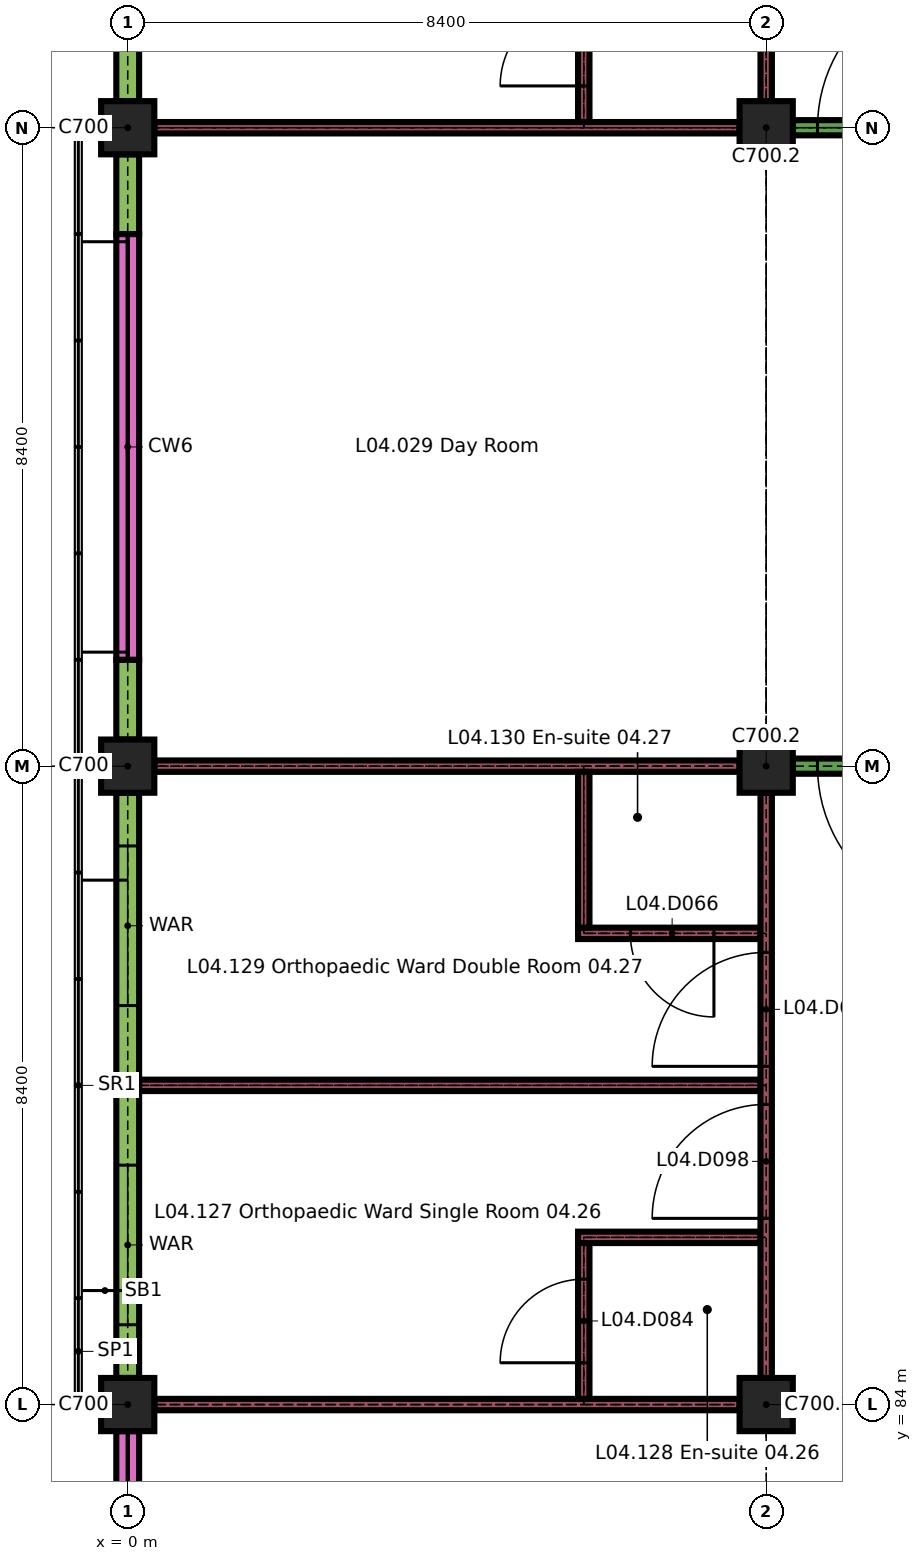
"""IFC4 building model, lengths in metres.
Left out: names, types, materials, properties, quantities, classifications, styles, units other than length and angle.
Written with IfcOpenShell. Run it as: python <this file> out.ifc"""

import sys

from ifc_helpers import new_model, si_unit, direction, frame, frame_2d, origin, origin_2d, place, context, subcontext, project, spatial, rectangle, extrude, element, fill, save


model = new_model("IFC4")
c1 = context("Model", 3, precision=1e-05, world=origin(), true_north=direction((0.0, 1.0)))
c2 = subcontext(c1, "Body", "Model", "MODEL_VIEW")
j1 = project(units=[si_unit("LENGTHUNIT", "METRE"), si_unit("PLANEANGLEUNIT", "RADIAN")], contexts=[c1])
p1 = place(None, origin())
s1 = spatial("IfcSite", under=j1, at=p1, CompositionType="ELEMENT")
p2 = place(p1, origin())
s2 = spatial("IfcBuilding", under=s1, at=p2, CompositionType="ELEMENT")
p3 = place(p2, frame((0.0, 0.0, 18.9)))
s3 = spatial("IfcBuildingStorey", under=s2, at=p3, CompositionType="ELEMENT", Elevation=18.9)
for number, where, z_axis, x_axis in (
    (1, (0.0, 84.0, 0.0), (0.0, 0.0, 1.0), (1.0, 0.0, 0.0)),
    (2, (8.4, 84.0, 0.0), (0.0, 0.0, 1.0), (1.0, 0.0, 0.0)),
    (3, (0.0, 92.4, 0.0), (0.0, 0.0, 1.0), (1.0, 0.0, 0.0)),
    (4, (8.4, 92.4, 0.0), (0.0, 0.0, 1.0), (1.0, 0.0, 0.0)),
    (5, (0.0, 100.8, 0.0), (0.0, 0.0, 1.0), (1.0, 0.0, 0.0)),
    (6, (8.4, 100.8, 0.0), (0.0, 0.0, 1.0), (1.0, 0.0, 0.0)),
):
    element("IfcColumn", number, at=place(p3, frame(where, z_axis=z_axis, x_axis=x_axis)), inside=s3, PredefinedType="COLUMN", context=c2, shape_type="SweptSolid", body=[
        extrude(rectangle(XDim=0.7, YDim=0.7, at=origin_2d()), origin(), (0.0, 0.0, 1.0), 3.26),
    ])
p4 = place(p3, frame((0.0, 79.8, 0.0), z_axis=(0.0, 0.0, 1.0), x_axis=(0.0, 1.0, 0.0)))
e7 = element("IfcWall", 7, at=p4, inside=s3, PredefinedType="SOLIDWALL", context=c2, shape_type="SweptSolid", body=[
    extrude(rectangle(XDim=3.85, YDim=0.3, at=frame_2d((1.925, 0.0))), origin(), (0.0, 0.0, 1.0), 0.6),
])
p5 = place(p3, frame((0.0, 84.35, 0.0), z_axis=(0.0, 0.0, 1.0), x_axis=(0.0, 1.0, 0.0)))
e8 = element("IfcWall", 8, at=p5, inside=s3, PredefinedType="SOLIDWALL", context=c2, shape_type="SweptSolid", body=[
    extrude(rectangle(XDim=3.85, YDim=0.3, at=frame_2d((1.925, 0.0))), origin(), (0.0, 0.0, 1.0), 2.96),
])
p6 = place(p5, frame((0.7, 0.0, 0.9)))
e9 = element("IfcOpeningElement", 9, at=p6, cuts=e8, PredefinedType="OPENING", context=c2, shape_type="SweptSolid", body=[
    extrude(rectangle(XDim=2.1, YDim=1.5, at=frame_2d((1.05, 0.75))), frame((0.0, 0.16, 0.0), z_axis=(0.0, -1.0, 0.0), x_axis=(1.0, 0.0, 0.0)), (0.0, 0.0, 1.0), 0.32),
])
p7 = place(p3, frame((0.0, 88.2, 0.0), z_axis=(0.0, 0.0, 1.0), x_axis=(0.0, 1.0, 0.0)))
e10 = element("IfcWall", 10, at=p7, inside=s3, PredefinedType="SOLIDWALL", context=c2, shape_type="SweptSolid", body=[
    extrude(rectangle(XDim=3.85, YDim=0.3, at=frame_2d((1.925, 0.0))), origin(), (0.0, 0.0, 1.0), 2.96),
])
p8 = place(p7, frame((1.05, 0.0, 0.9)))
e11 = element("IfcOpeningElement", 11, at=p8, cuts=e10, PredefinedType="OPENING", context=c2, shape_type="SweptSolid", body=[
    extrude(rectangle(XDim=2.1, YDim=1.5, at=frame_2d((1.05, 0.75))), frame((0.0, 0.16, 0.0), z_axis=(0.0, -1.0, 0.0), x_axis=(1.0, 0.0, 0.0)), (0.0, 0.0, 1.0), 0.32),
])
for number, where, z_axis, x_axis in (
    (12, (0.0, 92.75, 0.0), (0.0, 0.0, 1.0), (0.0, 1.0, 0.0)),
    (13, (0.0, 99.4, 0.0), (0.0, 0.0, 1.0), (0.0, 1.0, 0.0)),
):
    element("IfcWall", number, at=place(p3, frame(where, z_axis=z_axis, x_axis=x_axis)), inside=s3, PredefinedType="SOLIDWALL", context=c2, shape_type="SweptSolid", body=[
        extrude(rectangle(XDim=1.05, YDim=0.3, at=frame_2d((0.525, 0.0))), origin(), (0.0, 0.0, 1.0), 2.96),
    ])
p9 = place(p3, frame((0.0, 93.8, 0.0), z_axis=(0.0, 0.0, 1.0), x_axis=(0.0, 1.0, 0.0)))
e14 = element("IfcWall", 14, at=p9, inside=s3, PredefinedType="SOLIDWALL", context=c2, shape_type="SweptSolid", body=[
    extrude(rectangle(XDim=5.6, YDim=0.3, at=frame_2d((2.8, 0.0))), origin(), (0.0, 0.0, 1.0), 0.6),
])
p10 = place(p3, frame((0.0, 101.15, 0.0), z_axis=(0.0, 0.0, 1.0), x_axis=(0.0, 1.0, 0.0)))
e15 = element("IfcWall", 15, at=p10, inside=s3, PredefinedType="SOLIDWALL", context=c2, shape_type="SweptSolid", body=[
    extrude(rectangle(XDim=3.85, YDim=0.3, at=frame_2d((1.925, 0.0))), origin(), (0.0, 0.0, 1.0), 2.96),
])
p11 = place(p10, frame((0.7, 0.0, 0.9)))
e16 = element("IfcOpeningElement", 16, at=p11, cuts=e15, PredefinedType="OPENING", context=c2, shape_type="SweptSolid", body=[
    extrude(rectangle(XDim=2.1, YDim=1.5, at=frame_2d((1.05, 0.75))), frame((0.0, 0.16, 0.0), z_axis=(0.0, -1.0, 0.0), x_axis=(1.0, 0.0, 0.0)), (0.0, 0.0, 1.0), 0.32),
])
p12 = place(p3, frame((0.35, 84.0, 0.0), z_axis=(0.0, 0.0, 1.0), x_axis=(1.0, 0.0, 0.0)))
e17 = element("IfcWall", 17, at=p12, inside=s3, PredefinedType="PARTITIONING", context=c2, shape_type="SweptSolid", body=[
    extrude(rectangle(XDim=7.7, YDim=0.15, at=frame_2d((3.85, 0.0))), origin(), (0.0, 0.0, 1.0), 3.26),
])
p13 = place(p3, frame((5.925, 86.2, 0.0), z_axis=(0.0, 0.0, 1.0), x_axis=(1.0, 0.0, 0.0)))
e18 = element("IfcWall", 18, at=p13, inside=s3, PredefinedType="PARTITIONING", context=c2, shape_type="SweptSolid", body=[
    extrude(rectangle(XDim=2.4, YDim=0.15, at=frame_2d((1.2, 0.0))), origin(), (0.0, 0.0, 1.0), 3.26),
])
p14 = place(p3, frame((0.15, 88.2, 0.0), z_axis=(0.0, 0.0, 1.0), x_axis=(1.0, 0.0, 0.0)))
e19 = element("IfcWall", 19, at=p14, inside=s3, PredefinedType="PARTITIONING", context=c2, shape_type="SweptSolid", body=[
    extrude(rectangle(XDim=8.175, YDim=0.15, at=frame_2d((4.087, 0.0))), origin(), (0.0, 0.0, 1.0), 3.26),
])
p15 = place(p3, frame((5.925, 90.2, 0.0), z_axis=(0.0, 0.0, 1.0), x_axis=(1.0, 0.0, 0.0)))
e20 = element("IfcWall", 20, at=p15, inside=s3, PredefinedType="PARTITIONING", context=c2, shape_type="SweptSolid", body=[
    extrude(rectangle(XDim=2.4, YDim=0.15, at=frame_2d((1.2, 0.0))), origin(), (0.0, 0.0, 1.0), 3.26),
])
p16 = place(p15, frame((0.688, 0.0, 0.0)))
e21 = element("IfcOpeningElement", 21, at=p16, cuts=e20, PredefinedType="OPENING", context=c2, shape_type="SweptSolid", body=[
    extrude(rectangle(XDim=1.1, YDim=2.1, at=frame_2d((0.55, 1.05))), frame((0.0, 0.085, 0.0), z_axis=(0.0, -1.0, 0.0), x_axis=(1.0, 0.0, 0.0)), (0.0, 0.0, 1.0), 0.17),
])
p17 = place(p3, frame((0.35, 92.4, 0.0), z_axis=(0.0, 0.0, 1.0), x_axis=(1.0, 0.0, 0.0)))
e22 = element("IfcWall", 22, at=p17, inside=s3, PredefinedType="PARTITIONING", context=c2, shape_type="SweptSolid", body=[
    extrude(rectangle(XDim=7.7, YDim=0.15, at=frame_2d((3.85, 0.0))), origin(), (0.0, 0.0, 1.0), 3.26),
])
p18 = place(p3, frame((8.75, 92.4, 0.0), z_axis=(0.0, 0.0, 1.0), x_axis=(1.0, 0.0, 0.0)))
e23 = element("IfcWall", 23, at=p18, inside=s3, PredefinedType="PARTITIONING", context=c2, shape_type="SweptSolid", body=[
    extrude(rectangle(XDim=7.7, YDim=0.2, at=frame_2d((3.85, 0.0))), origin(), (0.0, 0.0, 1.0), 3.26),
])
p19 = place(p18, frame((0.325, 0.0, 0.0)))
e24 = element("IfcOpeningElement", 24, at=p19, cuts=e23, PredefinedType="OPENING", context=c2, shape_type="SweptSolid", body=[
    extrude(rectangle(XDim=2.0, YDim=2.4, at=frame_2d((1.0, 1.2))), frame((0.0, 0.11, 0.0), z_axis=(0.0, -1.0, 0.0), x_axis=(1.0, 0.0, 0.0)), (0.0, 0.0, 1.0), 0.22),
])
p20 = place(p18, frame((5.375, 0.0, 0.0)))
e25 = element("IfcOpeningElement", 25, at=p20, cuts=e23, PredefinedType="OPENING", context=c2, shape_type="SweptSolid", body=[
    extrude(rectangle(XDim=2.0, YDim=2.4, at=frame_2d((1.0, 1.2))), frame((0.0, 0.11, 0.0), z_axis=(0.0, -1.0, 0.0), x_axis=(1.0, 0.0, 0.0)), (0.0, 0.0, 1.0), 0.22),
])
p21 = place(p3, frame((0.35, 100.8, 0.0), z_axis=(0.0, 0.0, 1.0), x_axis=(1.0, 0.0, 0.0)))
e26 = element("IfcWall", 26, at=p21, inside=s3, PredefinedType="PARTITIONING", context=c2, shape_type="SweptSolid", body=[
    extrude(rectangle(XDim=7.7, YDim=0.15, at=frame_2d((3.85, 0.0))), origin(), (0.0, 0.0, 1.0), 3.26),
])
p22 = place(p3, frame((8.75, 100.8, 0.0), z_axis=(0.0, 0.0, 1.0), x_axis=(1.0, 0.0, 0.0)))
e27 = element("IfcWall", 27, at=p22, inside=s3, PredefinedType="PARTITIONING", context=c2, shape_type="SweptSolid", body=[
    extrude(rectangle(XDim=7.7, YDim=0.2, at=frame_2d((3.85, 0.0))), origin(), (0.0, 0.0, 1.0), 3.26),
])
p23 = place(p22, frame((0.325, 0.0, 0.0)))
e28 = element("IfcOpeningElement", 28, at=p23, cuts=e27, PredefinedType="OPENING", context=c2, shape_type="SweptSolid", body=[
    extrude(rectangle(XDim=2.0, YDim=2.4, at=frame_2d((1.0, 1.2))), frame((0.0, 0.11, 0.0), z_axis=(0.0, -1.0, 0.0), x_axis=(1.0, 0.0, 0.0)), (0.0, 0.0, 1.0), 0.22),
])
p24 = place(p22, frame((5.375, 0.0, 0.0)))
e29 = element("IfcOpeningElement", 29, at=p24, cuts=e27, PredefinedType="OPENING", context=c2, shape_type="SweptSolid", body=[
    extrude(rectangle(XDim=2.0, YDim=2.4, at=frame_2d((1.0, 1.2))), frame((0.0, 0.11, 0.0), z_axis=(0.0, -1.0, 0.0), x_axis=(1.0, 0.0, 0.0)), (0.0, 0.0, 1.0), 0.22),
])
p25 = place(p3, frame((6.0, 84.075, 0.0), z_axis=(0.0, 0.0, 1.0), x_axis=(0.0, 1.0, 0.0)))
e30 = element("IfcWall", 30, at=p25, inside=s3, PredefinedType="PARTITIONING", context=c2, shape_type="SweptSolid", body=[
    extrude(rectangle(XDim=2.05, YDim=0.15, at=frame_2d((1.025, 0.0))), origin(), (0.0, 0.0, 1.0), 3.26),
])
p26 = place(p25, frame((0.475, 0.0, 0.0)))
e31 = element("IfcOpeningElement", 31, at=p26, cuts=e30, PredefinedType="OPENING", context=c2, shape_type="SweptSolid", body=[
    extrude(rectangle(XDim=1.1, YDim=2.1, at=frame_2d((0.55, 1.05))), frame((0.0, 0.085, 0.0), z_axis=(0.0, -1.0, 0.0), x_axis=(1.0, 0.0, 0.0)), (0.0, 0.0, 1.0), 0.17),
])
p27 = place(p3, frame((6.0, 90.275, 0.0), z_axis=(0.0, 0.0, 1.0), x_axis=(0.0, 1.0, 0.0)))
e32 = element("IfcWall", 32, at=p27, inside=s3, PredefinedType="PARTITIONING", context=c2, shape_type="SweptSolid", body=[
    extrude(rectangle(XDim=2.05, YDim=0.15, at=frame_2d((1.025, 0.0))), origin(), (0.0, 0.0, 1.0), 3.26),
])
p28 = place(p3, frame((6.0, 100.875, 0.0), z_axis=(0.0, 0.0, 1.0), x_axis=(0.0, 1.0, 0.0)))
e33 = element("IfcWall", 33, at=p28, inside=s3, PredefinedType="PARTITIONING", context=c2, shape_type="SweptSolid", body=[
    extrude(rectangle(XDim=2.05, YDim=0.15, at=frame_2d((1.025, 0.0))), origin(), (0.0, 0.0, 1.0), 3.26),
])
p29 = place(p28, frame((0.475, 0.0, 0.0)))
e34 = element("IfcOpeningElement", 34, at=p29, cuts=e33, PredefinedType="OPENING", context=c2, shape_type="SweptSolid", body=[
    extrude(rectangle(XDim=1.1, YDim=2.1, at=frame_2d((0.55, 1.05))), frame((0.0, 0.085, 0.0), z_axis=(0.0, -1.0, 0.0), x_axis=(1.0, 0.0, 0.0)), (0.0, 0.0, 1.0), 0.17),
])
p30 = place(p3, frame((8.4, 84.35, 0.0), z_axis=(0.0, 0.0, 1.0), x_axis=(0.0, 1.0, 0.0)))
e35 = element("IfcWall", 35, at=p30, inside=s3, PredefinedType="PARTITIONING", context=c2, shape_type="SweptSolid", body=[
    extrude(rectangle(XDim=7.7, YDim=0.15, at=frame_2d((3.85, 0.0))), origin(), (0.0, 0.0, 1.0), 3.26),
])
p31 = place(p30, frame((2.1, 0.0, 0.0)))
e36 = element("IfcOpeningElement", 36, at=p31, cuts=e35, PredefinedType="OPENING", context=c2, shape_type="SweptSolid", body=[
    extrude(rectangle(XDim=1.5, YDim=2.4, at=frame_2d((0.75, 1.2))), frame((0.0, 0.085, 0.0), z_axis=(0.0, -1.0, 0.0), x_axis=(1.0, 0.0, 0.0)), (0.0, 0.0, 1.0), 0.17),
])
p32 = place(p30, frame((4.1, 0.0, 0.0)))
e37 = element("IfcOpeningElement", 37, at=p32, cuts=e35, PredefinedType="OPENING", context=c2, shape_type="SweptSolid", body=[
    extrude(rectangle(XDim=1.5, YDim=2.4, at=frame_2d((0.75, 1.2))), frame((0.0, 0.085, 0.0), z_axis=(0.0, -1.0, 0.0), x_axis=(1.0, 0.0, 0.0)), (0.0, 0.0, 1.0), 0.17),
])
p33 = place(p3, frame((8.4, 101.15, 0.0), z_axis=(0.0, 0.0, 1.0), x_axis=(0.0, 1.0, 0.0)))
e38 = element("IfcWall", 38, at=p33, inside=s3, PredefinedType="PARTITIONING", context=c2, shape_type="SweptSolid", body=[
    extrude(rectangle(XDim=7.7, YDim=0.15, at=frame_2d((3.85, 0.0))), origin(), (0.0, 0.0, 1.0), 3.26),
])
p34 = place(p33, frame((2.1, 0.0, 0.0)))
e39 = element("IfcOpeningElement", 39, at=p34, cuts=e38, PredefinedType="OPENING", context=c2, shape_type="SweptSolid", body=[
    extrude(rectangle(XDim=1.5, YDim=2.4, at=frame_2d((0.75, 1.2))), frame((0.0, 0.085, 0.0), z_axis=(0.0, -1.0, 0.0), x_axis=(1.0, 0.0, 0.0)), (0.0, 0.0, 1.0), 0.17),
])
p35 = place(p33, frame((4.1, 0.0, 0.0)))
e40 = element("IfcOpeningElement", 40, at=p35, cuts=e38, PredefinedType="OPENING", context=c2, shape_type="SweptSolid", body=[
    extrude(rectangle(XDim=1.5, YDim=2.4, at=frame_2d((0.75, 1.2))), frame((0.0, 0.085, 0.0), z_axis=(0.0, -1.0, 0.0), x_axis=(1.0, 0.0, 0.0)), (0.0, 0.0, 1.0), 0.17),
])
p36 = place(p6, origin())
e41 = element("IfcWindow", 41, at=p36, inside=s3, PartitioningType="DOUBLE_PANEL_VERTICAL", PredefinedType="WINDOW", context=c2, shape_type="SweptSolid", body=[
    extrude(rectangle(XDim=2.1, YDim=1.5, at=frame_2d((1.05, 0.75))), frame((0.0, 0.05, 0.0), z_axis=(0.0, -1.0, 0.0), x_axis=(1.0, 0.0, 0.0)), (0.0, 0.0, 1.0), 0.1),
])
fill(e9, e41)
p37 = place(p8, origin())
e42 = element("IfcWindow", 42, at=p37, inside=s3, PartitioningType="DOUBLE_PANEL_VERTICAL", PredefinedType="WINDOW", context=c2, shape_type="SweptSolid", body=[
    extrude(rectangle(XDim=2.1, YDim=1.5, at=frame_2d((1.05, 0.75))), frame((0.0, 0.05, 0.0), z_axis=(0.0, -1.0, 0.0), x_axis=(1.0, 0.0, 0.0)), (0.0, 0.0, 1.0), 0.1),
])
fill(e11, e42)
p38 = place(p16, origin())
e43 = element("IfcDoor", 43, at=p38, inside=s3, OperationType="SINGLE_SWING_RIGHT", PredefinedType="DOOR", context=c2, shape_type="SweptSolid", body=[
    extrude(rectangle(XDim=1.1, YDim=2.1, at=frame_2d((0.55, 1.05))), frame((0.0, 0.025, 0.0), z_axis=(0.0, -1.0, 0.0), x_axis=(1.0, 0.0, 0.0)), (0.0, 0.0, 1.0), 0.05),
])
fill(e21, e43)
p39 = place(p19, origin())
e44 = element("IfcDoor", 44, at=p39, inside=s3, OperationType="SINGLE_SWING_RIGHT", PredefinedType="DOOR", context=c2, shape_type="SweptSolid", body=[
    extrude(rectangle(XDim=2.0, YDim=2.4, at=frame_2d((1.0, 1.2))), frame((0.0, 0.03, 0.0), z_axis=(0.0, -1.0, 0.0), x_axis=(1.0, 0.0, 0.0)), (0.0, 0.0, 1.0), 0.06),
])
fill(e24, e44)
p40 = place(p23, origin())
e45 = element("IfcDoor", 45, at=p40, inside=s3, OperationType="SINGLE_SWING_LEFT", PredefinedType="DOOR", context=c2, shape_type="SweptSolid", body=[
    extrude(rectangle(XDim=2.0, YDim=2.4, at=frame_2d((1.0, 1.2))), frame((0.0, 0.03, 0.0), z_axis=(0.0, -1.0, 0.0), x_axis=(1.0, 0.0, 0.0)), (0.0, 0.0, 1.0), 0.06),
])
fill(e28, e45)
p41 = place(p26, origin())
e46 = element("IfcDoor", 46, at=p41, inside=s3, OperationType="SINGLE_SWING_RIGHT", PredefinedType="DOOR", context=c2, shape_type="SweptSolid", body=[
    extrude(rectangle(XDim=1.1, YDim=2.1, at=frame_2d((0.55, 1.05))), frame((0.0, 0.025, 0.0), z_axis=(0.0, -1.0, 0.0), x_axis=(1.0, 0.0, 0.0)), (0.0, 0.0, 1.0), 0.05),
])
fill(e31, e46)
p42 = place(p29, origin())
e47 = element("IfcDoor", 47, at=p42, inside=s3, OperationType="SINGLE_SWING_RIGHT", PredefinedType="DOOR", context=c2, shape_type="SweptSolid", body=[
    extrude(rectangle(XDim=1.1, YDim=2.1, at=frame_2d((0.55, 1.05))), frame((0.0, 0.025, 0.0), z_axis=(0.0, -1.0, 0.0), x_axis=(1.0, 0.0, 0.0)), (0.0, 0.0, 1.0), 0.05),
])
fill(e34, e47)
p43 = place(p31, origin())
e48 = element("IfcDoor", 48, at=p43, inside=s3, OperationType="SINGLE_SWING_RIGHT", PredefinedType="DOOR", context=c2, shape_type="SweptSolid", body=[
    extrude(rectangle(XDim=1.5, YDim=2.4, at=frame_2d((0.75, 1.2))), frame((0.0, 0.03, 0.0), z_axis=(0.0, -1.0, 0.0), x_axis=(1.0, 0.0, 0.0)), (0.0, 0.0, 1.0), 0.06),
])
fill(e36, e48)
p44 = place(p32, origin())
e49 = element("IfcDoor", 49, at=p44, inside=s3, OperationType="SINGLE_SWING_RIGHT", PredefinedType="DOOR", context=c2, shape_type="SweptSolid", body=[
    extrude(rectangle(XDim=1.5, YDim=2.4, at=frame_2d((0.75, 1.2))), frame((0.0, 0.03, 0.0), z_axis=(0.0, -1.0, 0.0), x_axis=(1.0, 0.0, 0.0)), (0.0, 0.0, 1.0), 0.06),
])
fill(e37, e49)
save(model, sys.argv[1])
